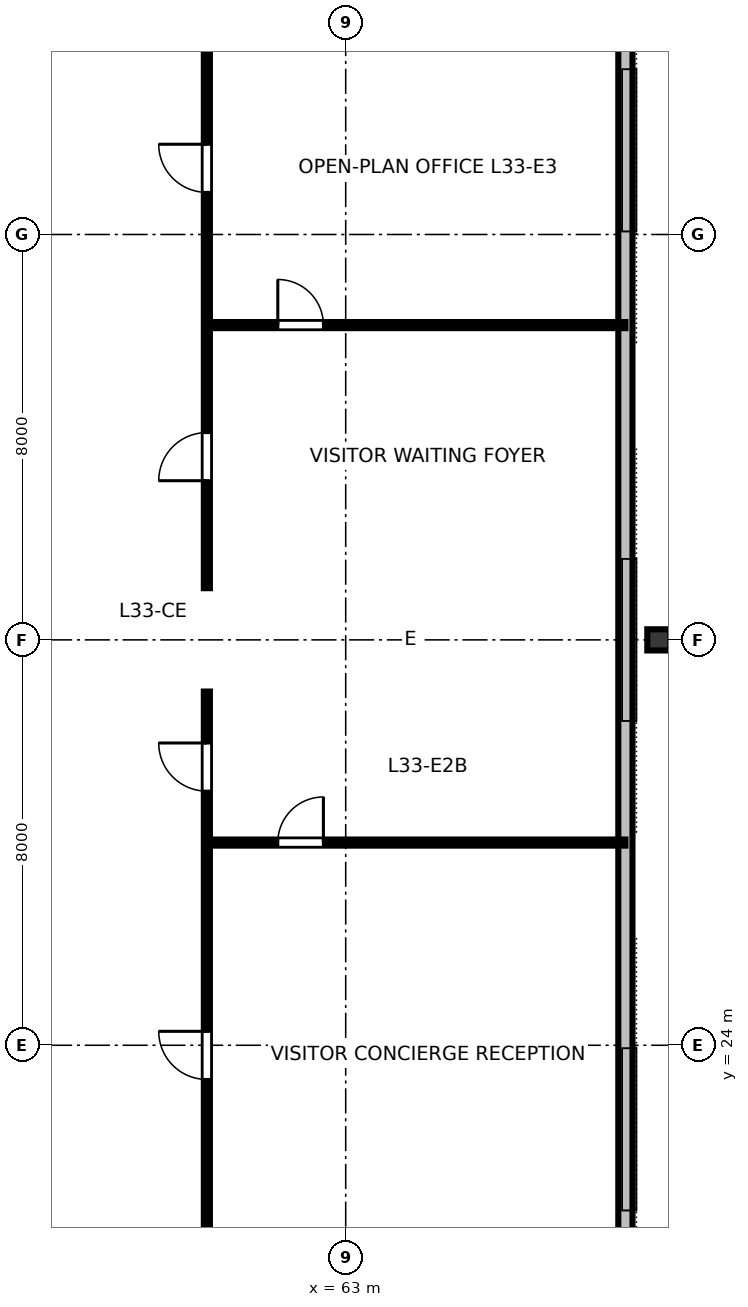
"""IFC4 building model, lengths in metres.
Left out: names, types, materials, properties, quantities, classifications, styles, units other than length and angle.
Written with IfcOpenShell. Run it as: python <this file> out.ifc"""

import sys

from ifc_helpers import new_model, si_unit, direction, frame, frame_2d, origin, origin_2d, place, context, subcontext, project, spatial, rectangle, i_section, extrude, element, fill, save


model = new_model("IFC4")
c1 = context("Model", 3, precision=1e-05, world=origin(), true_north=direction((0.0, 1.0)))
c2 = subcontext(c1, "Body", "Model", "MODEL_VIEW")
j1 = project(units=[si_unit("LENGTHUNIT", "METRE"), si_unit("PLANEANGLEUNIT", "RADIAN")], contexts=[c1])
p1 = place(None, origin())
s1 = spatial("IfcSite", under=j1, at=p1, CompositionType="ELEMENT")
p2 = place(p1, origin())
s2 = spatial("IfcBuilding", under=s1, at=p2, CompositionType="ELEMENT")
p3 = place(p2, frame((0.0, 0.0, 127.6)))
s3 = spatial("IfcBuildingStorey", under=s2, at=p3, CompositionType="ELEMENT", Elevation=127.6)
p4 = place(p3, frame((69.18, 32.0, 0.0), z_axis=(0.0, 0.0, 1.0), x_axis=(0.0, 1.0, 0.0)))
e1 = element("IfcColumn", 1, at=p4, inside=s3, PredefinedType="COLUMN", context=c2, shape_type="SweptSolid", body=[
    extrude(i_section(OverallWidth=0.418, OverallDepth=0.455, WebThickness=0.042, FlangeThickness=0.068, FilletRadius=0.025, at=origin_2d()), origin(), (0.0, 0.0, 1.0), 3.358),
])
p5 = place(p3, frame((68.52, 16.61, 0.0), z_axis=(0.0, 0.0, 1.0), x_axis=(0.0, 1.0, 0.0)))
e2 = element("IfcWall", 2, at=p5, inside=s3, PredefinedType="STANDARD", context=c2, shape_type="SweptSolid", body=[
    extrude(rectangle(XDim=30.78, YDim=0.28, at=frame_2d((15.39, 0.0))), origin(), (0.0, 0.0, 1.0), 3.36),
])
p6 = place(p3, frame((60.26, 28.0, 0.0), z_axis=(0.0, 0.0, 1.0), x_axis=(1.0, 0.0, 0.0)))
e3 = element("IfcWall", 3, at=p6, inside=s3, PredefinedType="PARTITIONING", context=c2, shape_type="SweptSolid", body=[
    extrude(rectangle(XDim=8.26, YDim=0.12, at=frame_2d((4.13, 0.0))), origin(), (0.0, 0.0, 1.0), 2.64),
])
p7 = place(p6, frame((1.4, 0.0, 0.0)))
e4 = element("IfcOpeningElement", 4, at=p7, cuts=e3, PredefinedType="OPENING", context=c2, shape_type="SweptSolid", body=[
    extrude(rectangle(XDim=0.9, YDim=2.15, at=frame_2d((0.45, 1.075))), frame((0.0, 0.07, 0.0), z_axis=(0.0, -1.0, 0.0), x_axis=(1.0, 0.0, 0.0)), (0.0, 0.0, 1.0), 0.14),
])
p8 = place(p3, frame((60.26, 38.212, 0.0), z_axis=(0.0, 0.0, 1.0), x_axis=(1.0, 0.0, 0.0)))
e5 = element("IfcWall", 5, at=p8, inside=s3, PredefinedType="PARTITIONING", context=c2, shape_type="SweptSolid", body=[
    extrude(rectangle(XDim=8.26, YDim=0.12, at=frame_2d((4.13, 0.0))), origin(), (0.0, 0.0, 1.0), 2.64),
])
p9 = place(p8, frame((1.4, 0.0, 0.0)))
e6 = element("IfcOpeningElement", 6, at=p9, cuts=e5, PredefinedType="OPENING", context=c2, shape_type="SweptSolid", body=[
    extrude(rectangle(XDim=0.9, YDim=2.15, at=frame_2d((0.45, 1.075))), frame((0.0, 0.07, 0.0), z_axis=(0.0, -1.0, 0.0), x_axis=(1.0, 0.0, 0.0)), (0.0, 0.0, 1.0), 0.14),
])
p10 = place(p3, frame((60.26, 19.4, 0.0), z_axis=(0.0, 0.0, 1.0), x_axis=(0.0, 1.0, 0.0)))
e7 = element("IfcWall", 7, at=p10, inside=s3, PredefinedType="PARTITIONING", context=c2, shape_type="SweptSolid", body=[
    extrude(rectangle(XDim=11.58, YDim=0.12, at=frame_2d((5.79, 0.0))), origin(), (0.0, 0.0, 1.0), 2.64),
])
p11 = place(p10, frame((3.925, 0.0, 0.0)))
e8 = element("IfcOpeningElement", 8, at=p11, cuts=e7, PredefinedType="OPENING", context=c2, shape_type="SweptSolid", body=[
    extrude(rectangle(XDim=0.95, YDim=2.15, at=frame_2d((0.475, 1.075))), frame((0.0, 0.07, 0.0), z_axis=(0.0, -1.0, 0.0), x_axis=(1.0, 0.0, 0.0)), (0.0, 0.0, 1.0), 0.14),
])
p12 = place(p10, frame((9.615, 0.0, 0.0)))
e9 = element("IfcOpeningElement", 9, at=p12, cuts=e7, PredefinedType="OPENING", context=c2, shape_type="SweptSolid", body=[
    extrude(rectangle(XDim=0.95, YDim=2.15, at=frame_2d((0.475, 1.075))), frame((0.0, 0.07, 0.0), z_axis=(0.0, -1.0, 0.0), x_axis=(1.0, 0.0, 0.0)), (0.0, 0.0, 1.0), 0.14),
])
p13 = place(p3, frame((60.26, 33.02, 0.0), z_axis=(0.0, 0.0, 1.0), x_axis=(0.0, 1.0, 0.0)))
e10 = element("IfcWall", 10, at=p13, inside=s3, PredefinedType="PARTITIONING", context=c2, shape_type="SweptSolid", body=[
    extrude(rectangle(XDim=11.58, YDim=0.12, at=frame_2d((5.79, 0.0))), origin(), (0.0, 0.0, 1.0), 2.64),
])
p14 = place(p13, frame((2.121, 0.0, 0.0)))
e11 = element("IfcOpeningElement", 11, at=p14, cuts=e10, PredefinedType="OPENING", context=c2, shape_type="SweptSolid", body=[
    extrude(rectangle(XDim=0.95, YDim=2.15, at=frame_2d((0.475, 1.075))), frame((0.0, 0.07, 0.0), z_axis=(0.0, -1.0, 0.0), x_axis=(1.0, 0.0, 0.0)), (0.0, 0.0, 1.0), 0.14),
])
p15 = place(p13, frame((7.811, 0.0, 0.0)))
e12 = element("IfcOpeningElement", 12, at=p15, cuts=e10, PredefinedType="OPENING", context=c2, shape_type="SweptSolid", body=[
    extrude(rectangle(XDim=0.95, YDim=2.15, at=frame_2d((0.475, 1.075))), frame((0.0, 0.07, 0.0), z_axis=(0.0, -1.0, 0.0), x_axis=(1.0, 0.0, 0.0)), (0.0, 0.0, 1.0), 0.14),
])
p16 = place(p7, origin())
e13 = element("IfcDoor", 13, at=p16, inside=s3, OperationType="SINGLE_SWING_RIGHT", PredefinedType="DOOR", context=c2, shape_type="SweptSolid", body=[
    extrude(rectangle(XDim=0.9, YDim=2.15, at=frame_2d((0.45, 1.075))), frame((0.0, 0.025, 0.0), z_axis=(0.0, -1.0, 0.0), x_axis=(1.0, 0.0, 0.0)), (0.0, 0.0, 1.0), 0.05),
])
fill(e4, e13)
p17 = place(p9, origin())
e14 = element("IfcDoor", 14, at=p17, inside=s3, OperationType="SINGLE_SWING_LEFT", PredefinedType="DOOR", context=c2, shape_type="SweptSolid", body=[
    extrude(rectangle(XDim=0.9, YDim=2.15, at=frame_2d((0.45, 1.075))), frame((0.0, 0.025, 0.0), z_axis=(0.0, -1.0, 0.0), x_axis=(1.0, 0.0, 0.0)), (0.0, 0.0, 1.0), 0.05),
])
fill(e6, e14)
p18 = place(p11, origin())
e15 = element("IfcDoor", 15, at=p18, inside=s3, OperationType="SINGLE_SWING_RIGHT", PredefinedType="DOOR", context=c2, shape_type="SweptSolid", body=[
    extrude(rectangle(XDim=0.95, YDim=2.15, at=frame_2d((0.475, 1.075))), frame((0.0, 0.025, 0.0), z_axis=(0.0, -1.0, 0.0), x_axis=(1.0, 0.0, 0.0)), (0.0, 0.0, 1.0), 0.05),
])
fill(e8, e15)
p19 = place(p12, origin())
e16 = element("IfcDoor", 16, at=p19, inside=s3, OperationType="SINGLE_SWING_RIGHT", PredefinedType="DOOR", context=c2, shape_type="SweptSolid", body=[
    extrude(rectangle(XDim=0.95, YDim=2.15, at=frame_2d((0.475, 1.075))), frame((0.0, 0.025, 0.0), z_axis=(0.0, -1.0, 0.0), x_axis=(1.0, 0.0, 0.0)), (0.0, 0.0, 1.0), 0.05),
])
fill(e9, e16)
p20 = place(p14, origin())
e17 = element("IfcDoor", 17, at=p20, inside=s3, OperationType="SINGLE_SWING_LEFT", PredefinedType="DOOR", context=c2, shape_type="SweptSolid", body=[
    extrude(rectangle(XDim=0.95, YDim=2.15, at=frame_2d((0.475, 1.075))), frame((0.0, 0.025, 0.0), z_axis=(0.0, -1.0, 0.0), x_axis=(1.0, 0.0, 0.0)), (0.0, 0.0, 1.0), 0.05),
])
fill(e11, e17)
p21 = place(p15, origin())
e18 = element("IfcDoor", 18, at=p21, inside=s3, OperationType="SINGLE_SWING_RIGHT", PredefinedType="DOOR", context=c2, shape_type="SweptSolid", body=[
    extrude(rectangle(XDim=0.95, YDim=2.15, at=frame_2d((0.475, 1.075))), frame((0.0, 0.025, 0.0), z_axis=(0.0, -1.0, 0.0), x_axis=(1.0, 0.0, 0.0)), (0.0, 0.0, 1.0), 0.05),
])
fill(e12, e18)
save(model, sys.argv[1])
